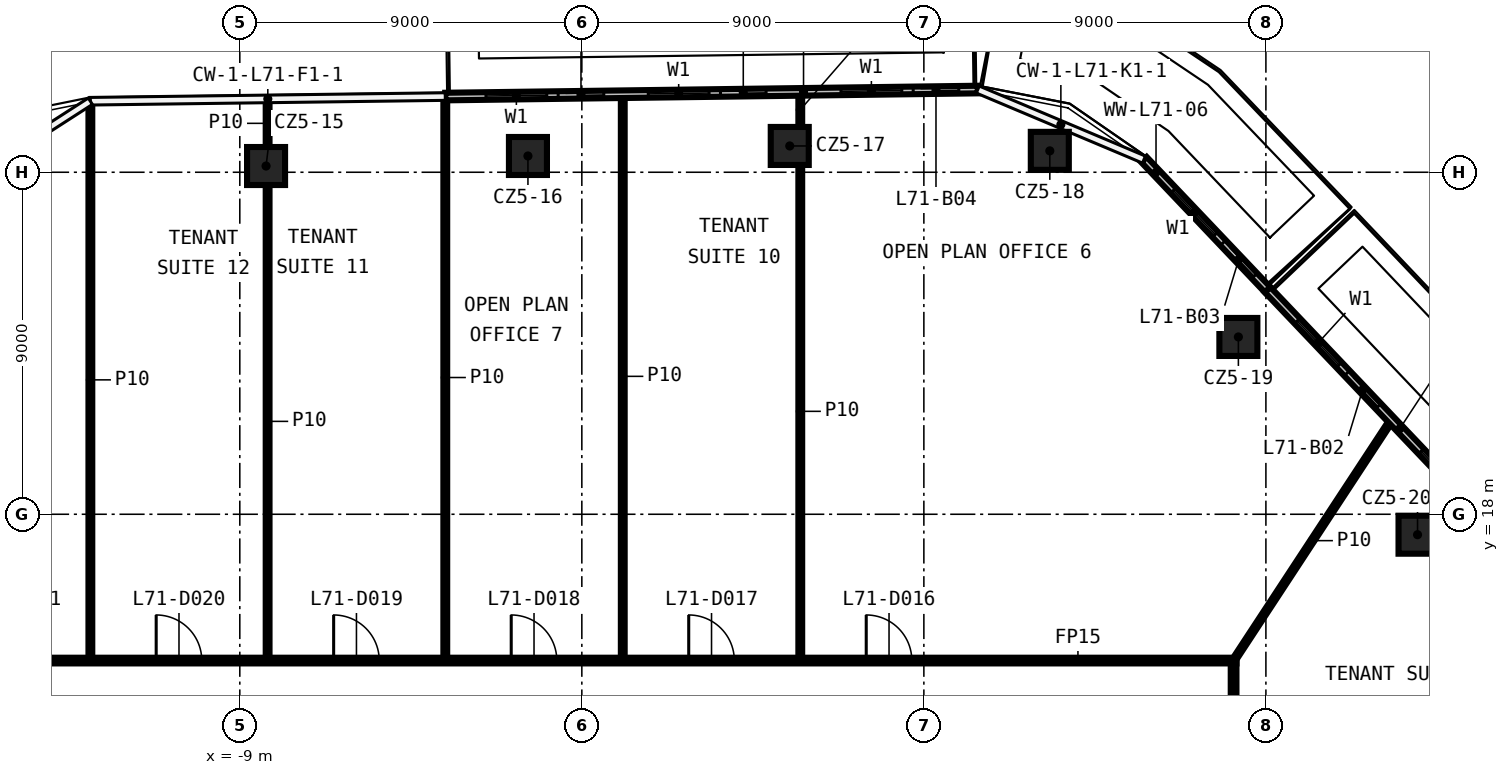
"""IFC4 building model, lengths in metres.
Left out: names, types, materials, properties, quantities, classifications, styles, units other than length and angle.
Written with IfcOpenShell. Run it as: python <this file> out.ifc"""

import sys

from ifc_helpers import new_model, si_unit, direction, frame, frame_2d, origin, origin_2d, place, context, subcontext, project, spatial, rectangle, extrude, element, fill, save


model = new_model("IFC4")
c1 = context("Model", 3, precision=1e-05, world=origin(), true_north=direction((0.0, 1.0)))
c2 = subcontext(c1, "Body", "Model", "MODEL_VIEW")
j1 = project(units=[si_unit("LENGTHUNIT", "METRE"), si_unit("PLANEANGLEUNIT", "RADIAN")], contexts=[c1])
p1 = place(None, origin())
s1 = spatial("IfcSite", under=j1, at=p1, CompositionType="ELEMENT")
p2 = place(p1, origin())
s2 = spatial("IfcBuilding", under=s1, at=p2, CompositionType="ELEMENT")
p3 = place(p2, frame((0.0, 0.0, 332.0)))
s3 = spatial("IfcBuildingStorey", under=s2, at=p3, CompositionType="ELEMENT", Elevation=332.0)
for number, where, z_axis, x_axis in (
    (1, (-8.309, 27.164, 0.0), (0.0, 0.0, 1.0), (1.0, 0.0, 0.0)),
    (2, (-1.418, 27.428, 0.0), (0.0, 0.0, 1.0), (1.0, 0.0, 0.0)),
    (3, (5.471, 27.692, 0.0), (0.0, 0.0, 1.0), (1.0, 0.0, 0.0)),
    (4, (12.314, 27.563, 0.0), (0.0, 0.0, 1.0), (1.0, 0.0, 0.0)),
    (5, (17.276, 22.666, 0.0), (0.0, 0.0, 1.0), (1.0, 0.0, 0.0)),
    (6, (21.99, 17.462, 0.0), (0.0, 0.0, 1.0), (1.0, 0.0, 0.0)),
):
    element("IfcColumn", number, at=place(p3, frame(where, z_axis=z_axis, x_axis=x_axis)), inside=s3, PredefinedType="COLUMN", context=c2, shape_type="SweptSolid", body=[
        extrude(rectangle(XDim=1.0, YDim=1.0, at=origin_2d()), origin(), (0.0, 0.0, 1.0), 3.82),
    ])
p4 = place(p3, frame((-17.225, 14.15, 0.0), z_axis=(0.0, 0.0, 1.0), x_axis=(1.0, 0.0, 0.0)))
e7 = element("IfcWall", 7, at=p4, inside=s3, PredefinedType="PARTITIONING", context=c2, shape_type="SweptSolid", body=[
    extrude(rectangle(XDim=34.45, YDim=0.15, at=frame_2d((17.225, 0.0))), origin(), (0.0, 0.0, 1.0), 3.82),
])
p5 = place(p4, frame((24.708, 0.0, 0.0)))
e8 = element("IfcOpeningElement", 8, at=p5, cuts=e7, PredefinedType="OPENING", context=c2, shape_type="SweptSolid", body=[
    extrude(rectangle(XDim=1.2, YDim=2.1, at=frame_2d((0.6, 1.05))), frame((0.0, 0.085, 0.0), z_axis=(0.0, -1.0, 0.0), x_axis=(1.0, 0.0, 0.0)), (0.0, 0.0, 1.0), 0.17),
])
p6 = place(p4, frame((20.038, 0.0, 0.0)))
e9 = element("IfcOpeningElement", 9, at=p6, cuts=e7, PredefinedType="OPENING", context=c2, shape_type="SweptSolid", body=[
    extrude(rectangle(XDim=1.2, YDim=2.1, at=frame_2d((0.6, 1.05))), frame((0.0, 0.085, 0.0), z_axis=(0.0, -1.0, 0.0), x_axis=(1.0, 0.0, 0.0)), (0.0, 0.0, 1.0), 0.17),
])
p7 = place(p4, frame((15.367, 0.0, 0.0)))
e10 = element("IfcOpeningElement", 10, at=p7, cuts=e7, PredefinedType="OPENING", context=c2, shape_type="SweptSolid", body=[
    extrude(rectangle(XDim=1.2, YDim=2.1, at=frame_2d((0.6, 1.05))), frame((0.0, 0.085, 0.0), z_axis=(0.0, -1.0, 0.0), x_axis=(1.0, 0.0, 0.0)), (0.0, 0.0, 1.0), 0.17),
])
p8 = place(p4, frame((10.695, 0.0, 0.0)))
e11 = element("IfcOpeningElement", 11, at=p8, cuts=e7, PredefinedType="OPENING", context=c2, shape_type="SweptSolid", body=[
    extrude(rectangle(XDim=1.2, YDim=2.1, at=frame_2d((0.6, 1.05))), frame((0.0, 0.085, 0.0), z_axis=(0.0, -1.0, 0.0), x_axis=(1.0, 0.0, 0.0)), (0.0, 0.0, 1.0), 0.17),
])
p9 = place(p4, frame((6.025, 0.0, 0.0)))
e12 = element("IfcOpeningElement", 12, at=p9, cuts=e7, PredefinedType="OPENING", context=c2, shape_type="SweptSolid", body=[
    extrude(rectangle(XDim=1.2, YDim=2.1, at=frame_2d((0.6, 1.05))), frame((0.0, 0.085, 0.0), z_axis=(0.0, -1.0, 0.0), x_axis=(1.0, 0.0, 0.0)), (0.0, 0.0, 1.0), 0.17),
])
p10 = place(p4, frame((1.698, 0.0, 0.0)))
e13 = element("IfcOpeningElement", 13, at=p10, cuts=e7, PredefinedType="OPENING", context=c2, shape_type="SweptSolid", body=[
    extrude(rectangle(XDim=1.2, YDim=2.1, at=frame_2d((0.6, 1.05))), frame((0.0, 0.085, 0.0), z_axis=(0.0, -1.0, 0.0), x_axis=(1.0, 0.0, 0.0)), (0.0, 0.0, 1.0), 0.17),
])
p11 = place(p3, frame((17.15, 14.15, 0.0), z_axis=(0.0, 0.0, 1.0), x_axis=(0.548731307267, 0.835998775373, 0.0)))
e14 = element("IfcWall", 14, at=p11, inside=s3, PredefinedType="PARTITIONING", context=c2, shape_type="SweptSolid", body=[
    extrude(rectangle(XDim=7.55, YDim=0.1, at=frame_2d((3.775, 0.0))), origin(), (0.0, 0.0, 1.0), 3.82),
])
p12 = place(p3, frame((17.15, 14.075, 0.0), z_axis=(0.0, 0.0, 1.0), x_axis=(0.0, -1.0, 0.0)))
e15 = element("IfcWall", 15, at=p12, inside=s3, PredefinedType="PARTITIONING", context=c2, shape_type="SweptSolid", body=[
    extrude(rectangle(XDim=28.15, YDim=0.15, at=frame_2d((14.075, 0.0))), origin(), (0.0, 0.0, 1.0), 3.82),
])
p13 = place(p12, frame((24.339, 0.0, 0.0)))
e16 = element("IfcOpeningElement", 16, at=p13, cuts=e15, PredefinedType="OPENING", context=c2, shape_type="SweptSolid", body=[
    extrude(rectangle(XDim=1.2, YDim=2.1, at=frame_2d((0.6, 1.05))), frame((0.0, 0.085, 0.0), z_axis=(0.0, -1.0, 0.0), x_axis=(1.0, 0.0, 0.0)), (0.0, 0.0, 1.0), 0.17),
])
p14 = place(p12, frame((20.227, 0.0, 0.0)))
e17 = element("IfcOpeningElement", 17, at=p14, cuts=e15, PredefinedType="OPENING", context=c2, shape_type="SweptSolid", body=[
    extrude(rectangle(XDim=1.2, YDim=2.1, at=frame_2d((0.6, 1.05))), frame((0.0, 0.085, 0.0), z_axis=(0.0, -1.0, 0.0), x_axis=(1.0, 0.0, 0.0)), (0.0, 0.0, 1.0), 0.17),
])
p15 = place(p12, frame((16.115, 0.0, 0.0)))
e18 = element("IfcOpeningElement", 18, at=p15, cuts=e15, PredefinedType="OPENING", context=c2, shape_type="SweptSolid", body=[
    extrude(rectangle(XDim=1.2, YDim=2.1, at=frame_2d((0.6, 1.05))), frame((0.0, 0.085, 0.0), z_axis=(0.0, -1.0, 0.0), x_axis=(1.0, 0.0, 0.0)), (0.0, 0.0, 1.0), 0.17),
])
p16 = place(p12, frame((12.006, 0.0, 0.0)))
e19 = element("IfcOpeningElement", 19, at=p16, cuts=e15, PredefinedType="OPENING", context=c2, shape_type="SweptSolid", body=[
    extrude(rectangle(XDim=1.2, YDim=2.1, at=frame_2d((0.6, 1.05))), frame((0.0, 0.085, 0.0), z_axis=(0.0, -1.0, 0.0), x_axis=(1.0, 0.0, 0.0)), (0.0, 0.0, 1.0), 0.17),
])
p17 = place(p12, frame((5.464, 0.0, 0.0)))
e20 = element("IfcOpeningElement", 20, at=p17, cuts=e15, PredefinedType="OPENING", context=c2, shape_type="SweptSolid", body=[
    extrude(rectangle(XDim=1.2, YDim=2.1, at=frame_2d((0.6, 1.05))), frame((0.0, 0.085, 0.0), z_axis=(0.0, -1.0, 0.0), x_axis=(1.0, 0.0, 0.0)), (0.0, 0.0, 1.0), 0.17),
])
p18 = place(p12, frame((1.569, 0.0, 0.0)))
e21 = element("IfcOpeningElement", 21, at=p18, cuts=e15, PredefinedType="OPENING", context=c2, shape_type="SweptSolid", body=[
    extrude(rectangle(XDim=1.2, YDim=2.1, at=frame_2d((0.6, 1.05))), frame((0.0, 0.085, 0.0), z_axis=(0.0, -1.0, 0.0), x_axis=(1.0, 0.0, 0.0)), (0.0, 0.0, 1.0), 0.17),
])
p19 = place(p3, frame((5.748, 14.225, 0.0), z_axis=(0.0, 0.0, 1.0), x_axis=(0.0, 1.0, 0.0)))
e22 = element("IfcWall", 22, at=p19, inside=s3, PredefinedType="PARTITIONING", context=c2, shape_type="SweptSolid", body=[
    extrude(rectangle(XDim=12.967, YDim=0.1, at=frame_2d((6.483, 0.0))), origin(), (0.0, 0.0, 1.0), 3.82),
])
p20 = place(p3, frame((5.748, 28.192, 0.0), z_axis=(0.0, 0.0, 1.0), x_axis=(0.0, 1.0, 0.0)))
e23 = element("IfcWall", 23, at=p20, inside=s3, PredefinedType="PARTITIONING", context=c2, shape_type="SweptSolid", body=[
    extrude(rectangle(XDim=0.903, YDim=0.1, at=frame_2d((0.452, 0.0))), origin(), (0.0, 0.0, 1.0), 3.82),
])
p21 = place(p3, frame((1.077, 14.225, 0.0), z_axis=(0.0, 0.0, 1.0), x_axis=(0.0, 1.0, 0.0)))
e24 = element("IfcWall", 24, at=p21, inside=s3, PredefinedType="PARTITIONING", context=c2, shape_type="SweptSolid", body=[
    extrude(rectangle(XDim=14.808, YDim=0.1, at=frame_2d((7.404, 0.0))), origin(), (0.0, 0.0, 1.0), 3.82),
])
p22 = place(p3, frame((-3.593, 14.225, 0.0), z_axis=(0.0, 0.0, 1.0), x_axis=(0.0, 1.0, 0.0)))
e25 = element("IfcWall", 25, at=p22, inside=s3, PredefinedType="PARTITIONING", context=c2, shape_type="SweptSolid", body=[
    extrude(rectangle(XDim=14.747, YDim=0.1, at=frame_2d((7.374, 0.0))), origin(), (0.0, 0.0, 1.0), 3.82),
])
p23 = place(p3, frame((-8.268, 14.225, 0.0), z_axis=(0.0, 0.0, 1.0), x_axis=(0.0, 1.0, 0.0)))
e26 = element("IfcWall", 26, at=p23, inside=s3, PredefinedType="PARTITIONING", context=c2, shape_type="SweptSolid", body=[
    extrude(rectangle(XDim=12.439, YDim=0.1, at=frame_2d((6.219, 0.0))), origin(), (0.0, 0.0, 1.0), 3.82),
])
p24 = place(p3, frame((-8.268, 27.664, 0.0), z_axis=(0.0, 0.0, 1.0), x_axis=(0.0, 1.0, 0.0)))
e27 = element("IfcWall", 27, at=p24, inside=s3, PredefinedType="PARTITIONING", context=c2, shape_type="SweptSolid", body=[
    extrude(rectangle(XDim=1.246, YDim=0.1, at=frame_2d((0.623, 0.0))), origin(), (0.0, 0.0, 1.0), 3.82),
])
p25 = place(p3, frame((-12.932, 14.225, 0.0), z_axis=(0.0, 0.0, 1.0), x_axis=(0.0, 1.0, 0.0)))
e28 = element("IfcWall", 28, at=p25, inside=s3, PredefinedType="PARTITIONING", context=c2, shape_type="SweptSolid", body=[
    extrude(rectangle(XDim=14.624, YDim=0.1, at=frame_2d((7.312, 0.0))), origin(), (0.0, 0.0, 1.0), 3.82),
])
p26 = place(p3, frame((24.563, 17.049, 0.0), z_axis=(0.0, 0.0, 1.0), x_axis=(-0.688807081371, 0.724944690755, 0.0)))
e29 = element("IfcWall", 29, at=p26, inside=s3, PredefinedType="SOLIDWALL", context=c2, shape_type="SweptSolid", body=[
    extrude(rectangle(XDim=9.465, YDim=0.2, at=frame_2d((4.732, 0.0))), origin(), (0.0, 0.0, 1.0), 3.82),
])
p27 = place(p26, frame((2.0, 0.0, 0.6)))
e30 = element("IfcOpeningElement", 30, at=p27, cuts=e29, PredefinedType="OPENING", context=c2, shape_type="SweptSolid", body=[
    extrude(rectangle(XDim=1.6, YDim=2.4, at=frame_2d((0.8, 1.2))), frame((0.0, 0.11, 0.0), z_axis=(0.0, -1.0, 0.0), x_axis=(1.0, 0.0, 0.0)), (0.0, 0.0, 1.0), 0.22),
])
p28 = place(p26, frame((0.3, 0.0, 0.0)))
e31 = element("IfcOpeningElement", 31, at=p28, cuts=e29, PredefinedType="OPENING", context=c2, shape_type="SweptSolid", body=[
    extrude(rectangle(XDim=1.2, YDim=2.4, at=frame_2d((0.6, 1.2))), frame((0.0, 0.11, 0.0), z_axis=(0.0, -1.0, 0.0), x_axis=(1.0, 0.0, 0.0)), (0.0, 0.0, 1.0), 0.22),
])
p29 = place(p26, frame((6.733, 0.0, 0.6)))
e32 = element("IfcOpeningElement", 32, at=p29, cuts=e29, PredefinedType="OPENING", context=c2, shape_type="SweptSolid", body=[
    extrude(rectangle(XDim=1.6, YDim=2.4, at=frame_2d((0.8, 1.2))), frame((0.0, 0.11, 0.0), z_axis=(0.0, -1.0, 0.0), x_axis=(1.0, 0.0, 0.0)), (0.0, 0.0, 1.0), 0.22),
])
p30 = place(p26, frame((5.233, 0.0, 0.0)))
e33 = element("IfcOpeningElement", 33, at=p30, cuts=e29, PredefinedType="OPENING", context=c2, shape_type="SweptSolid", body=[
    extrude(rectangle(XDim=1.2, YDim=2.4, at=frame_2d((0.6, 1.2))), frame((0.0, 0.11, 0.0), z_axis=(0.0, -1.0, 0.0), x_axis=(1.0, 0.0, 0.0)), (0.0, 0.0, 1.0), 0.22),
])
p31 = place(p3, frame((18.044, 23.91, 0.0), z_axis=(0.0, 0.0, 1.0), x_axis=(-0.688806527413, 0.724945217098, 0.0)))
e34 = element("IfcWall", 34, at=p31, inside=s3, PredefinedType="SOLIDWALL", context=c2, shape_type="SweptSolid", body=[
    extrude(rectangle(XDim=4.722, YDim=0.2, at=frame_2d((2.361, 0.0))), origin(), (0.0, 0.0, 1.0), 3.82),
])
p32 = place(p31, frame((2.0, 0.0, 0.6)))
e35 = element("IfcOpeningElement", 35, at=p32, cuts=e34, PredefinedType="OPENING", context=c2, shape_type="SweptSolid", body=[
    extrude(rectangle(XDim=1.6, YDim=2.4, at=frame_2d((0.8, 1.2))), frame((0.0, 0.11, 0.0), z_axis=(0.0, -1.0, 0.0), x_axis=(1.0, 0.0, 0.0)), (0.0, 0.0, 1.0), 0.22),
])
p33 = place(p31, frame((0.5, 0.0, 0.0)))
e36 = element("IfcOpeningElement", 36, at=p33, cuts=e34, PredefinedType="OPENING", context=c2, shape_type="SweptSolid", body=[
    extrude(rectangle(XDim=1.2, YDim=2.4, at=frame_2d((0.6, 1.2))), frame((0.0, 0.11, 0.0), z_axis=(0.0, -1.0, 0.0), x_axis=(1.0, 0.0, 0.0)), (0.0, 0.0, 1.0), 0.22),
])
p34 = place(p3, frame((10.419, 29.177, 0.0), z_axis=(0.0, 0.0, 1.0), x_axis=(-0.999913262087, -0.013170736582, 0.0)))
e37 = element("IfcWall", 37, at=p34, inside=s3, PredefinedType="SOLIDWALL", context=c2, shape_type="SweptSolid", body=[
    extrude(rectangle(XDim=14.014, YDim=0.2, at=frame_2d((7.007, 0.0))), origin(), (0.0, 0.0, 1.0), 3.82),
])
p35 = place(p34, frame((2.0, 0.0, 0.6)))
e38 = element("IfcOpeningElement", 38, at=p35, cuts=e37, PredefinedType="OPENING", context=c2, shape_type="SweptSolid", body=[
    extrude(rectangle(XDim=1.6, YDim=2.4, at=frame_2d((0.8, 1.2))), frame((0.0, 0.11, 0.0), z_axis=(0.0, -1.0, 0.0), x_axis=(1.0, 0.0, 0.0)), (0.0, 0.0, 1.0), 0.22),
])
p36 = place(p34, frame((0.5, 0.0, 0.0)))
e39 = element("IfcOpeningElement", 39, at=p36, cuts=e37, PredefinedType="OPENING", context=c2, shape_type="SweptSolid", body=[
    extrude(rectangle(XDim=1.2, YDim=2.4, at=frame_2d((0.6, 1.2))), frame((0.0, 0.11, 0.0), z_axis=(0.0, -1.0, 0.0), x_axis=(1.0, 0.0, 0.0)), (0.0, 0.0, 1.0), 0.22),
])
p37 = place(p34, frame((7.071, 0.0, 0.6)))
e40 = element("IfcOpeningElement", 40, at=p37, cuts=e37, PredefinedType="OPENING", context=c2, shape_type="SweptSolid", body=[
    extrude(rectangle(XDim=1.6, YDim=2.4, at=frame_2d((0.8, 1.2))), frame((0.0, 0.11, 0.0), z_axis=(0.0, -1.0, 0.0), x_axis=(1.0, 0.0, 0.0)), (0.0, 0.0, 1.0), 0.22),
])
p38 = place(p34, frame((5.571, 0.0, 0.0)))
e41 = element("IfcOpeningElement", 41, at=p38, cuts=e37, PredefinedType="OPENING", context=c2, shape_type="SweptSolid", body=[
    extrude(rectangle(XDim=1.2, YDim=2.4, at=frame_2d((0.6, 1.2))), frame((0.0, 0.11, 0.0), z_axis=(0.0, -1.0, 0.0), x_axis=(1.0, 0.0, 0.0)), (0.0, 0.0, 1.0), 0.22),
])
p39 = place(p34, frame((11.342, 0.0, 0.6)))
e42 = element("IfcOpeningElement", 42, at=p39, cuts=e37, PredefinedType="OPENING", context=c2, shape_type="SweptSolid", body=[
    extrude(rectangle(XDim=1.6, YDim=2.4, at=frame_2d((0.8, 1.2))), frame((0.0, 0.11, 0.0), z_axis=(0.0, -1.0, 0.0), x_axis=(1.0, 0.0, 0.0)), (0.0, 0.0, 1.0), 0.22),
])
p40 = place(p34, frame((9.842, 0.0, 0.0)))
e43 = element("IfcOpeningElement", 43, at=p40, cuts=e37, PredefinedType="OPENING", context=c2, shape_type="SweptSolid", body=[
    extrude(rectangle(XDim=1.2, YDim=2.4, at=frame_2d((0.6, 1.2))), frame((0.0, 0.11, 0.0), z_axis=(0.0, -1.0, 0.0), x_axis=(1.0, 0.0, 0.0)), (0.0, 0.0, 1.0), 0.22),
])
p41 = place(p5, origin())
e44 = element("IfcDoor", 44, at=p41, inside=s3, OperationType="SINGLE_SWING_LEFT", PredefinedType="DOOR", context=c2, shape_type="SweptSolid", body=[
    extrude(rectangle(XDim=1.2, YDim=2.1, at=frame_2d((0.6, 1.05))), frame((0.0, 0.025, 0.0), z_axis=(0.0, -1.0, 0.0), x_axis=(1.0, 0.0, 0.0)), (0.0, 0.0, 1.0), 0.05),
])
fill(e8, e44)
p42 = place(p6, origin())
e45 = element("IfcDoor", 45, at=p42, inside=s3, OperationType="SINGLE_SWING_RIGHT", PredefinedType="DOOR", context=c2, shape_type="SweptSolid", body=[
    extrude(rectangle(XDim=1.2, YDim=2.1, at=frame_2d((0.6, 1.05))), frame((0.0, 0.025, 0.0), z_axis=(0.0, -1.0, 0.0), x_axis=(1.0, 0.0, 0.0)), (0.0, 0.0, 1.0), 0.05),
])
fill(e9, e45)
p43 = place(p7, origin())
e46 = element("IfcDoor", 46, at=p43, inside=s3, OperationType="SINGLE_SWING_LEFT", PredefinedType="DOOR", context=c2, shape_type="SweptSolid", body=[
    extrude(rectangle(XDim=1.2, YDim=2.1, at=frame_2d((0.6, 1.05))), frame((0.0, 0.025, 0.0), z_axis=(0.0, -1.0, 0.0), x_axis=(1.0, 0.0, 0.0)), (0.0, 0.0, 1.0), 0.05),
])
fill(e10, e46)
p44 = place(p8, origin())
e47 = element("IfcDoor", 47, at=p44, inside=s3, OperationType="SINGLE_SWING_RIGHT", PredefinedType="DOOR", context=c2, shape_type="SweptSolid", body=[
    extrude(rectangle(XDim=1.2, YDim=2.1, at=frame_2d((0.6, 1.05))), frame((0.0, 0.025, 0.0), z_axis=(0.0, -1.0, 0.0), x_axis=(1.0, 0.0, 0.0)), (0.0, 0.0, 1.0), 0.05),
])
fill(e11, e47)
p45 = place(p9, origin())
e48 = element("IfcDoor", 48, at=p45, inside=s3, OperationType="SINGLE_SWING_LEFT", PredefinedType="DOOR", context=c2, shape_type="SweptSolid", body=[
    extrude(rectangle(XDim=1.2, YDim=2.1, at=frame_2d((0.6, 1.05))), frame((0.0, 0.025, 0.0), z_axis=(0.0, -1.0, 0.0), x_axis=(1.0, 0.0, 0.0)), (0.0, 0.0, 1.0), 0.05),
])
fill(e12, e48)
p46 = place(p27, origin())
e49 = element("IfcWindow", 49, at=p46, inside=s3, PartitioningType="SINGLE_PANEL", PredefinedType="WINDOW", context=c2, shape_type="SweptSolid", body=[
    extrude(rectangle(XDim=1.6, YDim=2.4, at=frame_2d((0.8, 1.2))), frame((0.0, 0.03, 0.0), z_axis=(0.0, -1.0, 0.0), x_axis=(1.0, 0.0, 0.0)), (0.0, 0.0, 1.0), 0.06),
])
fill(e30, e49)
p47 = place(p29, origin())
e50 = element("IfcWindow", 50, at=p47, inside=s3, PartitioningType="SINGLE_PANEL", PredefinedType="WINDOW", context=c2, shape_type="SweptSolid", body=[
    extrude(rectangle(XDim=1.6, YDim=2.4, at=frame_2d((0.8, 1.2))), frame((0.0, 0.03, 0.0), z_axis=(0.0, -1.0, 0.0), x_axis=(1.0, 0.0, 0.0)), (0.0, 0.0, 1.0), 0.06),
])
fill(e32, e50)
p48 = place(p30, origin())
e51 = element("IfcDoor", 51, at=p48, inside=s3, OperationType="SLIDING_TO_LEFT", PredefinedType="DOOR", context=c2, shape_type="SweptSolid", body=[
    extrude(rectangle(XDim=1.2, YDim=2.4, at=frame_2d((0.6, 1.2))), frame((0.0, 0.025, 0.0), z_axis=(0.0, -1.0, 0.0), x_axis=(1.0, 0.0, 0.0)), (0.0, 0.0, 1.0), 0.05),
])
fill(e33, e51)
p49 = place(p32, origin())
e52 = element("IfcWindow", 52, at=p49, inside=s3, PartitioningType="SINGLE_PANEL", PredefinedType="WINDOW", context=c2, shape_type="SweptSolid", body=[
    extrude(rectangle(XDim=1.6, YDim=2.4, at=frame_2d((0.8, 1.2))), frame((0.0, 0.03, 0.0), z_axis=(0.0, -1.0, 0.0), x_axis=(1.0, 0.0, 0.0)), (0.0, 0.0, 1.0), 0.06),
])
fill(e35, e52)
p50 = place(p33, origin())
e53 = element("IfcDoor", 53, at=p50, inside=s3, OperationType="SLIDING_TO_LEFT", PredefinedType="DOOR", context=c2, shape_type="SweptSolid", body=[
    extrude(rectangle(XDim=1.2, YDim=2.4, at=frame_2d((0.6, 1.2))), frame((0.0, 0.025, 0.0), z_axis=(0.0, -1.0, 0.0), x_axis=(1.0, 0.0, 0.0)), (0.0, 0.0, 1.0), 0.05),
])
fill(e36, e53)
p51 = place(p35, origin())
e54 = element("IfcWindow", 54, at=p51, inside=s3, PartitioningType="SINGLE_PANEL", PredefinedType="WINDOW", context=c2, shape_type="SweptSolid", body=[
    extrude(rectangle(XDim=1.6, YDim=2.4, at=frame_2d((0.8, 1.2))), frame((0.0, 0.03, 0.0), z_axis=(0.0, -1.0, 0.0), x_axis=(1.0, 0.0, 0.0)), (0.0, 0.0, 1.0), 0.06),
])
fill(e38, e54)
p52 = place(p36, origin())
e55 = element("IfcDoor", 55, at=p52, inside=s3, OperationType="SLIDING_TO_LEFT", PredefinedType="DOOR", context=c2, shape_type="SweptSolid", body=[
    extrude(rectangle(XDim=1.2, YDim=2.4, at=frame_2d((0.6, 1.2))), frame((0.0, 0.025, 0.0), z_axis=(0.0, -1.0, 0.0), x_axis=(1.0, 0.0, 0.0)), (0.0, 0.0, 1.0), 0.05),
])
fill(e39, e55)
p53 = place(p37, origin())
e56 = element("IfcWindow", 56, at=p53, inside=s3, PartitioningType="SINGLE_PANEL", PredefinedType="WINDOW", context=c2, shape_type="SweptSolid", body=[
    extrude(rectangle(XDim=1.6, YDim=2.4, at=frame_2d((0.8, 1.2))), frame((0.0, 0.03, 0.0), z_axis=(0.0, -1.0, 0.0), x_axis=(1.0, 0.0, 0.0)), (0.0, 0.0, 1.0), 0.06),
])
fill(e40, e56)
p54 = place(p38, origin())
e57 = element("IfcDoor", 57, at=p54, inside=s3, OperationType="SLIDING_TO_LEFT", PredefinedType="DOOR", context=c2, shape_type="SweptSolid", body=[
    extrude(rectangle(XDim=1.2, YDim=2.4, at=frame_2d((0.6, 1.2))), frame((0.0, 0.025, 0.0), z_axis=(0.0, -1.0, 0.0), x_axis=(1.0, 0.0, 0.0)), (0.0, 0.0, 1.0), 0.05),
])
fill(e41, e57)
p55 = place(p39, origin())
e58 = element("IfcWindow", 58, at=p55, inside=s3, PartitioningType="SINGLE_PANEL", PredefinedType="WINDOW", context=c2, shape_type="SweptSolid", body=[
    extrude(rectangle(XDim=1.6, YDim=2.4, at=frame_2d((0.8, 1.2))), frame((0.0, 0.03, 0.0), z_axis=(0.0, -1.0, 0.0), x_axis=(1.0, 0.0, 0.0)), (0.0, 0.0, 1.0), 0.06),
])
fill(e42, e58)
p56 = place(p40, origin())
e59 = element("IfcDoor", 59, at=p56, inside=s3, OperationType="SLIDING_TO_LEFT", PredefinedType="DOOR", context=c2, shape_type="SweptSolid", body=[
    extrude(rectangle(XDim=1.2, YDim=2.4, at=frame_2d((0.6, 1.2))), frame((0.0, 0.025, 0.0), z_axis=(0.0, -1.0, 0.0), x_axis=(1.0, 0.0, 0.0)), (0.0, 0.0, 1.0), 0.05),
])
fill(e43, e59)
save(model, sys.argv[1])
